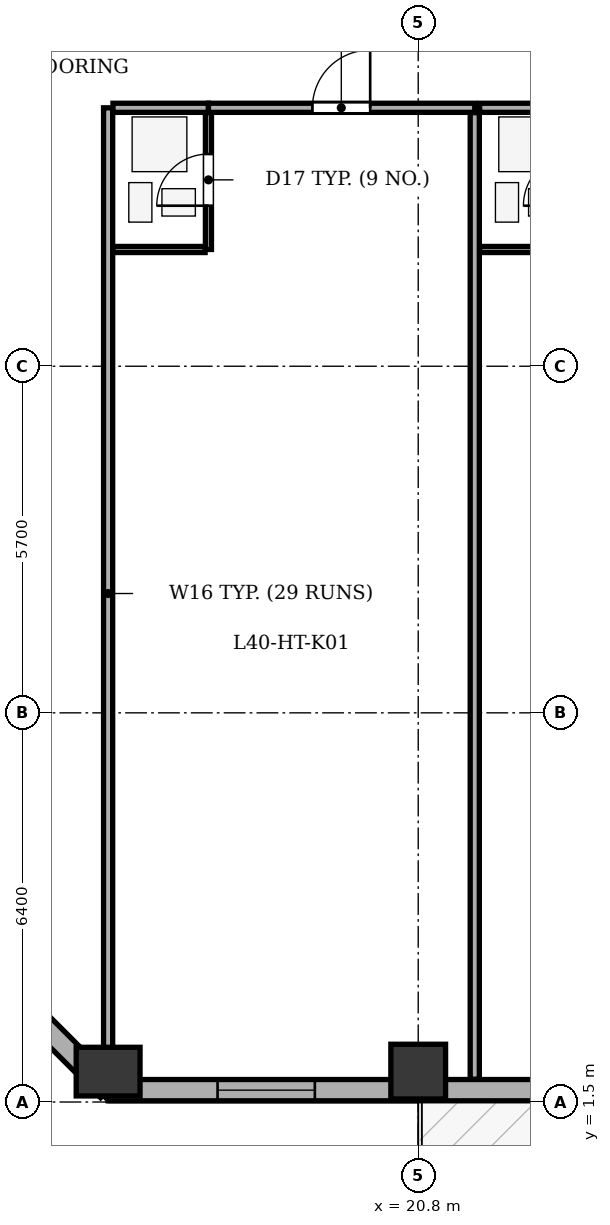
"""IFC4 building model, lengths in metres.
Left out: names, types, materials, properties, quantities, classifications, styles, units other than length and angle.
Written with IfcOpenShell. Run it as: python <this file> out.ifc"""

import sys

from ifc_helpers import new_model, si_unit, direction, frame, frame_2d, origin, origin_2d, place, context, subcontext, project, spatial, rectangle, extrude, element, fill, save


model = new_model("IFC4")
c1 = context("Model", 3, precision=1e-05, world=origin(), true_north=direction((0.0, 1.0)))
c2 = subcontext(c1, "Body", "Model", "MODEL_VIEW")
j1 = project(units=[si_unit("LENGTHUNIT", "METRE"), si_unit("PLANEANGLEUNIT", "RADIAN")], contexts=[c1])
p1 = place(None, origin())
s1 = spatial("IfcSite", under=j1, at=p1, CompositionType="ELEMENT")
p2 = place(p1, origin())
s2 = spatial("IfcBuilding", under=s1, at=p2, CompositionType="ELEMENT")
p3 = place(p2, frame((0.0, 0.0, 158.8)))
s3 = spatial("IfcBuildingStorey", under=s2, at=p3, CompositionType="ELEMENT", Elevation=158.8)
p4 = place(p3, frame((15.7, 2.0, 0.0), z_axis=(0.0, 0.0, 1.0), x_axis=(1.0, 0.0, 0.0)))
e1 = element("IfcColumn", 1, at=p4, inside=s3, PredefinedType="COLUMN", context=c2, shape_type="SweptSolid", body=[
    extrude(rectangle(XDim=0.8, YDim=1.05, at=origin_2d()), origin(), (0.0, 0.0, 1.0), 3.5),
])
p5 = place(p3, frame((20.8, 2.0, 0.0), z_axis=(0.0, 0.0, 1.0), x_axis=(1.0, 0.0, 0.0)))
e2 = element("IfcColumn", 2, at=p5, inside=s3, PredefinedType="COLUMN", context=c2, shape_type="SweptSolid", body=[
    extrude(rectangle(XDim=0.9, YDim=0.9, at=origin_2d()), origin(), (0.0, 0.0, 1.0), 3.5),
])
p6 = place(p3, frame((50.7, 1.695, 0.0), z_axis=(0.0, 0.0, 1.0), x_axis=(-1.0, 0.0, 0.0)))
e3 = element("IfcWall", 3, at=p6, inside=s3, PredefinedType="STANDARD", context=c2, shape_type="SweptSolid", body=[
    extrude(rectangle(XDim=35.0, YDim=0.35, at=frame_2d((17.5, 0.0))), origin(), (0.0, 0.0, 1.0), 2.435),
])
p7 = place(p6, frame((26.0, 0.0, 0.0)))
e4 = element("IfcOpeningElement", 4, at=p7, cuts=e3, PredefinedType="OPENING", context=c2, shape_type="SweptSolid", body=[
    extrude(rectangle(XDim=1.0, YDim=2.02, at=frame_2d((0.5, 1.01))), frame((0.0, 0.185, 0.0), z_axis=(0.0, -1.0, 0.0), x_axis=(1.0, 0.0, 0.0)), (0.0, 0.0, 1.0), 0.37),
])
p8 = place(p6, frame((1.775, 0.0, 0.75)))
e5 = element("IfcOpeningElement", 5, at=p8, cuts=e3, PredefinedType="OPENING", context=c2, shape_type="SweptSolid", body=[
    extrude(rectangle(XDim=1.6, YDim=1.565, at=frame_2d((0.8, 0.782))), frame((0.0, 0.185, 0.0), z_axis=(0.0, -1.0, 0.0), x_axis=(1.0, 0.0, 0.0)), (0.0, 0.0, 1.0), 0.37),
])
p9 = place(p6, frame((6.764, 0.0, 0.75)))
e6 = element("IfcOpeningElement", 6, at=p9, cuts=e3, PredefinedType="OPENING", context=c2, shape_type="SweptSolid", body=[
    extrude(rectangle(XDim=1.6, YDim=1.565, at=frame_2d((0.8, 0.782))), frame((0.0, 0.185, 0.0), z_axis=(0.0, -1.0, 0.0), x_axis=(1.0, 0.0, 0.0)), (0.0, 0.0, 1.0), 0.37),
])
p10 = place(p6, frame((11.989, 0.0, 0.75)))
e7 = element("IfcOpeningElement", 7, at=p10, cuts=e3, PredefinedType="OPENING", context=c2, shape_type="SweptSolid", body=[
    extrude(rectangle(XDim=1.6, YDim=1.565, at=frame_2d((0.8, 0.782))), frame((0.0, 0.185, 0.0), z_axis=(0.0, -1.0, 0.0), x_axis=(1.0, 0.0, 0.0)), (0.0, 0.0, 1.0), 0.37),
])
p11 = place(p6, frame((18.604, 0.0, 0.75)))
e8 = element("IfcOpeningElement", 8, at=p11, cuts=e3, PredefinedType="OPENING", context=c2, shape_type="SweptSolid", body=[
    extrude(rectangle(XDim=1.6, YDim=1.565, at=frame_2d((0.8, 0.782))), frame((0.0, 0.185, 0.0), z_axis=(0.0, -1.0, 0.0), x_axis=(1.0, 0.0, 0.0)), (0.0, 0.0, 1.0), 0.37),
])
p12 = place(p6, frame((31.6, 0.0, 0.75)))
e9 = element("IfcOpeningElement", 9, at=p12, cuts=e3, PredefinedType="OPENING", context=c2, shape_type="SweptSolid", body=[
    extrude(rectangle(XDim=1.6, YDim=1.565, at=frame_2d((0.8, 0.782))), frame((0.0, 0.185, 0.0), z_axis=(0.0, -1.0, 0.0), x_axis=(1.0, 0.0, 0.0)), (0.0, 0.0, 1.0), 0.37),
])
p13 = place(p3, frame((15.7, 1.695, 0.0), z_axis=(0.0, 0.0, 1.0), x_axis=(-0.707106781187, 0.707106781187, 0.0)))
e10 = element("IfcWall", 10, at=p13, inside=s3, PredefinedType="STANDARD", context=c2, shape_type="SweptSolid", body=[
    extrude(rectangle(XDim=6.795, YDim=0.35, at=frame_2d((3.397, 0.0))), origin(), (0.0, 0.0, 1.0), 2.435),
])
p14 = place(p13, frame((2.698, 0.0, 0.75)))
e11 = element("IfcOpeningElement", 11, at=p14, cuts=e10, PredefinedType="OPENING", context=c2, shape_type="SweptSolid", body=[
    extrude(rectangle(XDim=1.4, YDim=1.565, at=frame_2d((0.7, 0.782))), frame((0.0, 0.185, 0.0), z_axis=(0.0, -1.0, 0.0), x_axis=(1.0, 0.0, 0.0)), (0.0, 0.0, 1.0), 0.37),
])
p15 = place(p3, frame((15.7, 1.875, 0.0), z_axis=(0.0, 0.0, 1.0), x_axis=(0.0, 1.0, 0.0)))
e12 = element("IfcWall", 12, at=p15, inside=s3, PredefinedType="PARTITIONING", context=c2, shape_type="SweptSolid", body=[
    extrude(rectangle(XDim=15.975, YDim=0.15, at=frame_2d((7.988, 0.0))), origin(), (0.0, 0.0, 1.0), 1.635),
])
p16 = place(p3, frame((15.78, 17.85, 0.0), z_axis=(0.0, 0.0, 1.0), x_axis=(1.0, 0.0, 0.0)))
e13 = element("IfcWall", 13, at=p16, inside=s3, PredefinedType="PARTITIONING", context=c2, shape_type="SweptSolid", body=[
    extrude(rectangle(XDim=1.57, YDim=0.15, at=frame_2d((0.785, 0.0))), origin(), (0.0, 0.0, 1.0), 3.05),
])
p17 = place(p3, frame((17.35, 17.85, 0.0), z_axis=(0.0, 0.0, 1.0), x_axis=(1.0, 0.0, 0.0)))
e14 = element("IfcWall", 14, at=p17, inside=s3, PredefinedType="PARTITIONING", context=c2, shape_type="SweptSolid", body=[
    extrude(rectangle(XDim=4.38, YDim=0.15, at=frame_2d((2.19, 0.0))), origin(), (0.0, 0.0, 1.0), 3.05),
])
p18 = place(p17, frame((1.71, 0.0, 0.0)))
e15 = element("IfcOpeningElement", 15, at=p18, cuts=e14, PredefinedType="OPENING", context=c2, shape_type="SweptSolid", body=[
    extrude(rectangle(XDim=0.95, YDim=2.1, at=frame_2d((0.475, 1.05))), frame((0.0, 0.085, 0.0), z_axis=(0.0, -1.0, 0.0), x_axis=(1.0, 0.0, 0.0)), (0.0, 0.0, 1.0), 0.17),
])
p19 = place(p3, frame((17.35, 15.52, 0.0), z_axis=(0.0, 0.0, 1.0), x_axis=(0.0, 1.0, 0.0)))
e16 = element("IfcWall", 16, at=p19, inside=s3, PredefinedType="PARTITIONING", context=c2, shape_type="SweptSolid", body=[
    extrude(rectangle(XDim=2.25, YDim=0.1, at=frame_2d((1.125, 0.0))), origin(), (0.0, 0.0, 1.0), 3.05),
])
p20 = place(p19, frame((0.72, 0.0, 0.0)))
e17 = element("IfcOpeningElement", 17, at=p20, cuts=e16, PredefinedType="OPENING", context=c2, shape_type="SweptSolid", body=[
    extrude(rectangle(XDim=0.85, YDim=2.05, at=frame_2d((0.425, 1.025))), frame((0.0, 0.06, 0.0), z_axis=(0.0, -1.0, 0.0), x_axis=(1.0, 0.0, 0.0)), (0.0, 0.0, 1.0), 0.12),
])
p21 = place(p3, frame((15.78, 15.52, 0.0), z_axis=(0.0, 0.0, 1.0), x_axis=(1.0, 0.0, 0.0)))
e18 = element("IfcWall", 18, at=p21, inside=s3, PredefinedType="PARTITIONING", context=c2, shape_type="SweptSolid", body=[
    extrude(rectangle(XDim=1.515, YDim=0.1, at=frame_2d((0.757, 0.0))), origin(), (0.0, 0.0, 1.0), 3.05),
])
p22 = place(p3, frame((21.73, 1.875, 0.0), z_axis=(0.0, 0.0, 1.0), x_axis=(0.0, 1.0, 0.0)))
e19 = element("IfcWall", 19, at=p22, inside=s3, PredefinedType="PARTITIONING", context=c2, shape_type="SweptSolid", body=[
    extrude(rectangle(XDim=15.895, YDim=0.15, at=frame_2d((7.948, 0.0))), origin(), (0.0, 0.0, 1.0), 3.05),
])
p23 = place(p3, frame((21.81, 17.85, 0.0), z_axis=(0.0, 0.0, 1.0), x_axis=(1.0, 0.0, 0.0)))
e20 = element("IfcWall", 20, at=p23, inside=s3, PredefinedType="PARTITIONING", context=c2, shape_type="SweptSolid", body=[
    extrude(rectangle(XDim=1.57, YDim=0.15, at=frame_2d((0.785, 0.0))), origin(), (0.0, 0.0, 1.0), 3.05),
])
p24 = place(p3, frame((21.81, 15.52, 0.0), z_axis=(0.0, 0.0, 1.0), x_axis=(1.0, 0.0, 0.0)))
e21 = element("IfcWall", 21, at=p24, inside=s3, PredefinedType="PARTITIONING", context=c2, shape_type="SweptSolid", body=[
    extrude(rectangle(XDim=1.515, YDim=0.1, at=frame_2d((0.757, 0.0))), origin(), (0.0, 0.0, 1.0), 3.05),
])
p25 = place(p12, origin())
e22 = element("IfcWindow", 22, at=p25, inside=s3, PartitioningType="SINGLE_PANEL", PredefinedType="WINDOW", context=c2, shape_type="SweptSolid", body=[
    extrude(rectangle(XDim=1.6, YDim=1.565, at=frame_2d((0.8, 0.782))), frame((0.0, -0.01, 0.0), z_axis=(0.0, -1.0, 0.0), x_axis=(1.0, 0.0, 0.0)), (0.0, 0.0, 1.0), 0.06),
])
fill(e9, e22)
p26 = place(p20, origin())
e23 = element("IfcDoor", 23, at=p26, inside=s3, OperationType="SINGLE_SWING_LEFT", PredefinedType="DOOR", context=c2, shape_type="SweptSolid", body=[
    extrude(rectangle(XDim=0.85, YDim=2.05, at=frame_2d((0.425, 1.025))), frame((0.0, 0.025, 0.0), z_axis=(0.0, -1.0, 0.0), x_axis=(1.0, 0.0, 0.0)), (0.0, 0.0, 1.0), 0.05),
])
fill(e17, e23)
p27 = place(p18, origin())
e24 = element("IfcDoor", 24, at=p27, inside=s3, OperationType="SINGLE_SWING_RIGHT", PredefinedType="DOOR", context=c2, shape_type="SweptSolid", body=[
    extrude(rectangle(XDim=0.95, YDim=2.1, at=frame_2d((0.475, 1.05))), frame((0.0, 0.025, 0.0), z_axis=(0.0, -1.0, 0.0), x_axis=(1.0, 0.0, 0.0)), (0.0, 0.0, 1.0), 0.05),
])
fill(e15, e24)
save(model, sys.argv[1])
